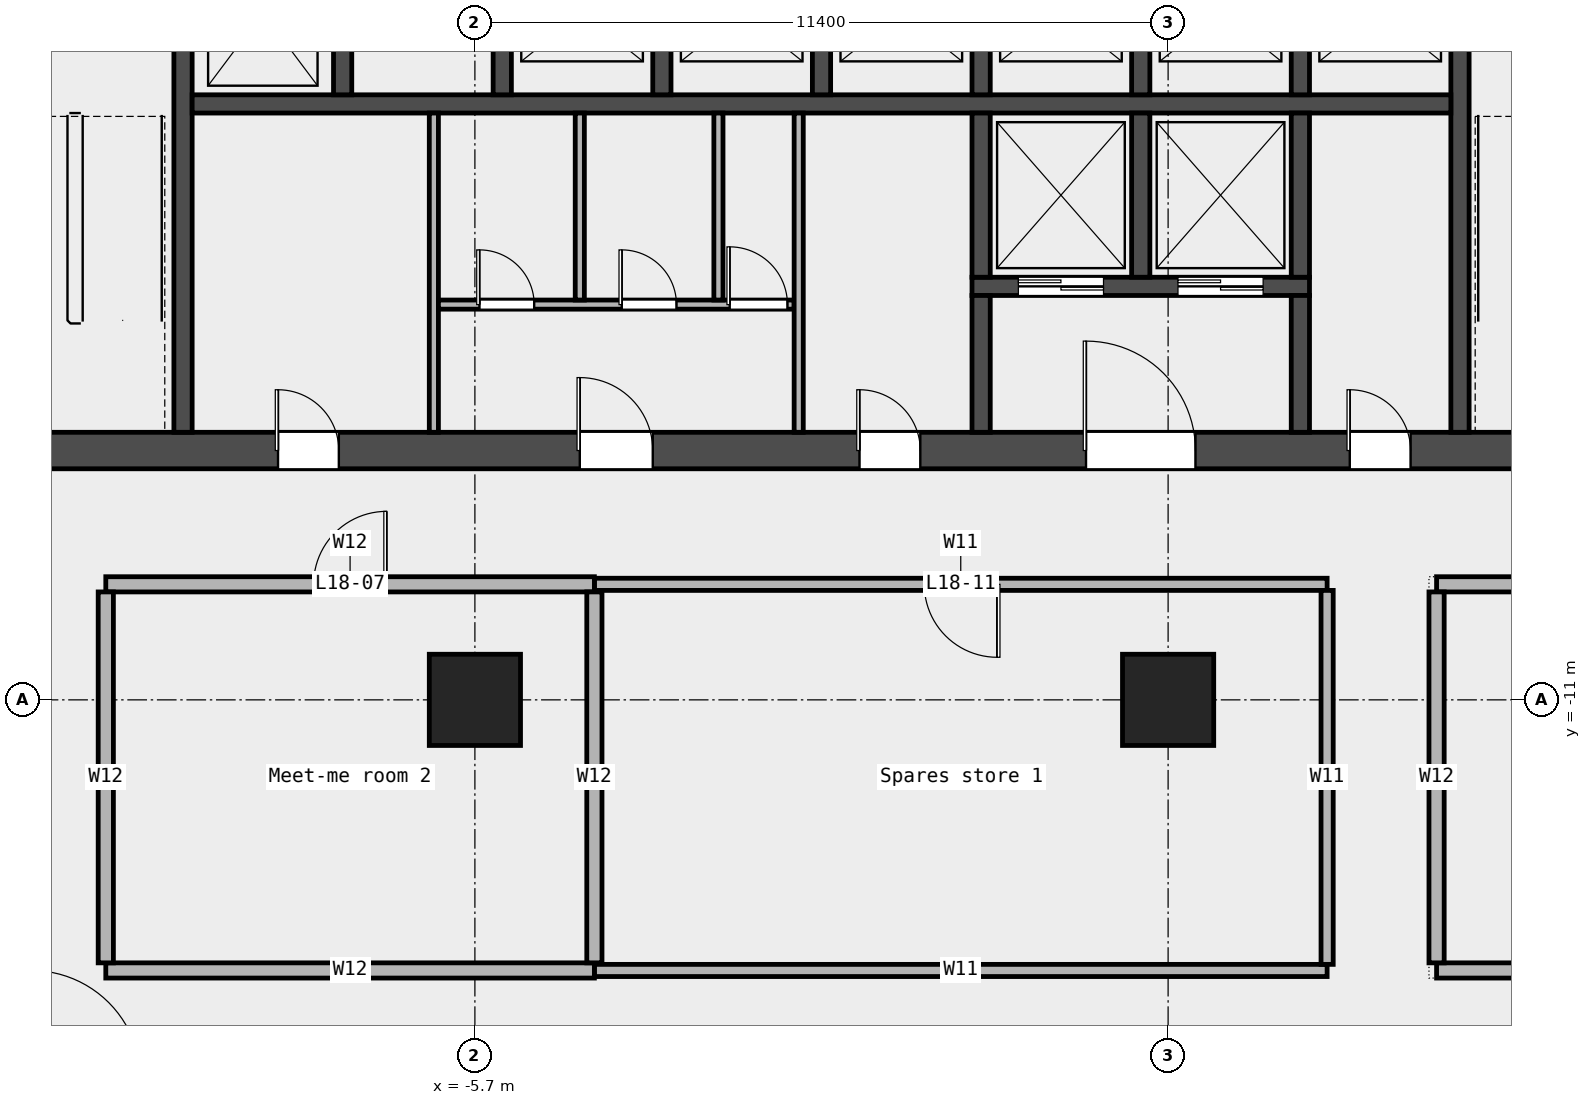
"""IFC4 building model, lengths in metres.
Left out: names, types, materials, properties, quantities, classifications, styles, units other than length and angle.
Written with IfcOpenShell. Run it as: python <this file> out.ifc"""

import sys

from ifc_helpers import new_model, si_unit, direction, frame, frame_2d, origin, origin_2d, place, context, subcontext, project, spatial, rectangle, extrude, element, fill, save


model = new_model("IFC4")
c1 = context("Model", 3, precision=1e-05, world=origin(), true_north=direction((0.0, 1.0)))
c2 = subcontext(c1, "Body", "Model", "MODEL_VIEW")
j1 = project(units=[si_unit("LENGTHUNIT", "METRE"), si_unit("PLANEANGLEUNIT", "RADIAN")], contexts=[c1])
p1 = place(None, origin())
s1 = spatial("IfcSite", under=j1, at=p1, CompositionType="ELEMENT")
p2 = place(p1, origin())
s2 = spatial("IfcBuilding", under=s1, at=p2, CompositionType="ELEMENT")
p3 = place(p2, frame((0.0, 0.0, 94.6)))
s3 = spatial("IfcBuildingStorey", under=s2, at=p3, CompositionType="ELEMENT", Elevation=94.6)
for number, where, z_axis, x_axis in (
    (1, (-5.7, -11.0, 0.0), (0.0, 0.0, 1.0), (1.0, 0.0, 0.0)),
    (2, (5.7, -11.0, 0.0), (0.0, 0.0, 1.0), (1.0, 0.0, 0.0)),
):
    element("IfcColumn", number, at=place(p3, frame(where, z_axis=z_axis, x_axis=x_axis)), inside=s3, PredefinedType="COLUMN", context=c2, shape_type="SweptSolid", body=[
        extrude(rectangle(XDim=1.5, YDim=1.5, at=origin_2d()), origin(), (0.0, 0.0, 1.0), 4.05),
    ])
p4 = place(p3, frame((-3.735, -15.45, 0.0), z_axis=(0.0, 0.0, 1.0), x_axis=(1.0, 0.0, 0.0)))
e3 = element("IfcWall", 3, at=p4, inside=s3, PredefinedType="PARTITIONING", context=c2, shape_type="SweptSolid", body=[
    extrude(rectangle(XDim=12.05, YDim=0.2, at=frame_2d((6.025, 0.0))), origin(), (0.0, 0.0, 1.0), 4.05),
])
p5 = place(p3, frame((-11.77, -15.45, 0.0), z_axis=(0.0, 0.0, 1.0), x_axis=(1.0, 0.0, 0.0)))
e4 = element("IfcWall", 4, at=p5, inside=s3, PredefinedType="PARTITIONING", context=c2, shape_type="SweptSolid", body=[
    extrude(rectangle(XDim=8.035, YDim=0.25, at=frame_2d((4.018, 0.0))), origin(), (0.0, 0.0, 1.0), 4.05),
])
p6 = place(p3, frame((10.115, -15.45, 0.0), z_axis=(0.0, 0.0, 1.0), x_axis=(1.0, 0.0, 0.0)))
e5 = element("IfcWall", 5, at=p6, inside=s3, PredefinedType="PARTITIONING", context=c2, shape_type="SweptSolid", body=[
    extrude(rectangle(XDim=18.885, YDim=0.25, at=frame_2d((9.442, 0.0))), origin(), (0.0, 0.0, 1.0), 4.05),
])
p7 = place(p6, frame((8.742, 0.0, 0.0)))
e6 = element("IfcOpeningElement", 6, at=p7, cuts=e5, PredefinedType="OPENING", context=c2, shape_type="SweptSolid", body=[
    extrude(rectangle(XDim=1.2, YDim=2.1, at=frame_2d((0.6, 1.05))), frame((0.0, 0.137, 0.0), z_axis=(0.0, -1.0, 0.0), x_axis=(1.0, 0.0, 0.0)), (0.0, 0.0, 1.0), 0.274),
])
p8 = place(p3, frame((-3.735, -9.1, 0.0), z_axis=(0.0, 0.0, 1.0), x_axis=(1.0, 0.0, 0.0)))
e7 = element("IfcWall", 7, at=p8, inside=s3, PredefinedType="PARTITIONING", context=c2, shape_type="SweptSolid", body=[
    extrude(rectangle(XDim=12.05, YDim=0.2, at=frame_2d((6.025, 0.0))), origin(), (0.0, 0.0, 1.0), 4.05),
])
p9 = place(p8, frame((5.425, 0.0, 0.0)))
e8 = element("IfcOpeningElement", 8, at=p9, cuts=e7, PredefinedType="OPENING", context=c2, shape_type="SweptSolid", body=[
    extrude(rectangle(XDim=1.2, YDim=2.1, at=frame_2d((0.6, 1.05))), frame((0.0, 0.112, 0.0), z_axis=(0.0, -1.0, 0.0), x_axis=(1.0, 0.0, 0.0)), (0.0, 0.0, 1.0), 0.224),
])
p10 = place(p3, frame((-11.77, -9.1, 0.0), z_axis=(0.0, 0.0, 1.0), x_axis=(1.0, 0.0, 0.0)))
e9 = element("IfcWall", 9, at=p10, inside=s3, PredefinedType="PARTITIONING", context=c2, shape_type="SweptSolid", body=[
    extrude(rectangle(XDim=8.035, YDim=0.25, at=frame_2d((4.018, 0.0))), origin(), (0.0, 0.0, 1.0), 4.05),
])
p11 = place(p10, frame((3.417, 0.0, 0.0)))
e10 = element("IfcOpeningElement", 10, at=p11, cuts=e9, PredefinedType="OPENING", context=c2, shape_type="SweptSolid", body=[
    extrude(rectangle(XDim=1.2, YDim=2.1, at=frame_2d((0.6, 1.05))), frame((0.0, 0.137, 0.0), z_axis=(0.0, -1.0, 0.0), x_axis=(1.0, 0.0, 0.0)), (0.0, 0.0, 1.0), 0.274),
])
p12 = place(p3, frame((10.115, -9.1, 0.0), z_axis=(0.0, 0.0, 1.0), x_axis=(1.0, 0.0, 0.0)))
e11 = element("IfcWall", 11, at=p12, inside=s3, PredefinedType="PARTITIONING", context=c2, shape_type="SweptSolid", body=[
    extrude(rectangle(XDim=18.885, YDim=0.25, at=frame_2d((9.442, 0.0))), origin(), (0.0, 0.0, 1.0), 4.05),
])
for number, where, z_axis, x_axis in (
    (12, (-11.77, -15.325, 0.0), (0.0, 0.0, 1.0), (0.0, 1.0, 0.0)),
    (13, (-3.735, -15.325, 0.0), (0.0, 0.0, 1.0), (0.0, 1.0, 0.0)),
):
    element("IfcWall", number, at=place(p3, frame(where, z_axis=z_axis, x_axis=x_axis)), inside=s3, PredefinedType="PARTITIONING", context=c2, shape_type="SweptSolid", body=[
        extrude(rectangle(XDim=6.1, YDim=0.25, at=frame_2d((3.05, 0.0))), origin(), (0.0, 0.0, 1.0), 4.05),
    ])
p13 = place(p3, frame((8.315, -15.35, 0.0), z_axis=(0.0, 0.0, 1.0), x_axis=(0.0, 1.0, 0.0)))
e14 = element("IfcWall", 14, at=p13, inside=s3, PredefinedType="PARTITIONING", context=c2, shape_type="SweptSolid", body=[
    extrude(rectangle(XDim=6.15, YDim=0.2, at=frame_2d((3.075, 0.0))), origin(), (0.0, 0.0, 1.0), 4.05),
])
p14 = place(p3, frame((10.115, -15.325, 0.0), z_axis=(0.0, 0.0, 1.0), x_axis=(0.0, 1.0, 0.0)))
e15 = element("IfcWall", 15, at=p14, inside=s3, PredefinedType="PARTITIONING", context=c2, shape_type="SweptSolid", body=[
    extrude(rectangle(XDim=6.1, YDim=0.25, at=frame_2d((3.05, 0.0))), origin(), (0.0, 0.0, 1.0), 4.05),
])
p15 = place(p3, frame((-14.4, -6.9, 0.0), z_axis=(0.0, 0.0, 1.0), x_axis=(1.0, 0.0, 0.0)))
e16 = element("IfcWall", 16, at=p15, inside=s3, PredefinedType="SHEAR", context=c2, shape_type="SweptSolid", body=[
    extrude(rectangle(XDim=28.8, YDim=0.6, at=frame_2d((14.4, 0.0))), origin(), (0.0, 0.0, 1.0), 4.2),
])
p16 = place(p15, frame((5.462, 0.0, 0.0)))
e17 = element("IfcOpeningElement", 17, at=p16, cuts=e16, PredefinedType="OPENING", context=c2, shape_type="SweptSolid", body=[
    extrude(rectangle(XDim=1.0, YDim=2.1, at=frame_2d((0.5, 1.05))), frame((0.0, 0.312, 0.0), z_axis=(0.0, -1.0, 0.0), x_axis=(1.0, 0.0, 0.0)), (0.0, 0.0, 1.0), 0.624),
])
p17 = place(p15, frame((10.425, 0.0, 0.0)))
e18 = element("IfcOpeningElement", 18, at=p17, cuts=e16, PredefinedType="OPENING", context=c2, shape_type="SweptSolid", body=[
    extrude(rectangle(XDim=1.2, YDim=2.1, at=frame_2d((0.6, 1.05))), frame((0.0, 0.312, 0.0), z_axis=(0.0, -1.0, 0.0), x_axis=(1.0, 0.0, 0.0)), (0.0, 0.0, 1.0), 0.624),
])
p18 = place(p15, frame((15.025, 0.0, 0.0)))
e19 = element("IfcOpeningElement", 19, at=p18, cuts=e16, PredefinedType="OPENING", context=c2, shape_type="SweptSolid", body=[
    extrude(rectangle(XDim=1.0, YDim=2.1, at=frame_2d((0.5, 1.05))), frame((0.0, 0.312, 0.0), z_axis=(0.0, -1.0, 0.0), x_axis=(1.0, 0.0, 0.0)), (0.0, 0.0, 1.0), 0.624),
])
p19 = place(p15, frame((18.75, 0.0, 0.0)))
e20 = element("IfcOpeningElement", 20, at=p19, cuts=e16, PredefinedType="OPENING", context=c2, shape_type="SweptSolid", body=[
    extrude(rectangle(XDim=1.8, YDim=2.1, at=frame_2d((0.9, 1.05))), frame((0.0, 0.312, 0.0), z_axis=(0.0, -1.0, 0.0), x_axis=(1.0, 0.0, 0.0)), (0.0, 0.0, 1.0), 0.624),
])
p20 = place(p15, frame((23.087, 0.0, 0.0)))
e21 = element("IfcOpeningElement", 21, at=p20, cuts=e16, PredefinedType="OPENING", context=c2, shape_type="SweptSolid", body=[
    extrude(rectangle(XDim=1.0, YDim=2.1, at=frame_2d((0.5, 1.05))), frame((0.0, 0.312, 0.0), z_axis=(0.0, -1.0, 0.0), x_axis=(1.0, 0.0, 0.0)), (0.0, 0.0, 1.0), 0.624),
])
for number, where, z_axis, x_axis in (
    (22, (-10.5, -6.6, 0.0), (0.0, 0.0, 1.0), (0.0, 1.0, 0.0)),
    (23, (10.5, -6.6, 0.0), (0.0, 0.0, 1.0), (0.0, 1.0, 0.0)),
):
    element("IfcWall", number, at=place(p3, frame(where, z_axis=z_axis, x_axis=x_axis)), inside=s3, PredefinedType="SHEAR", context=c2, shape_type="SweptSolid", body=[
        extrude(rectangle(XDim=8.55, YDim=0.3, at=frame_2d((4.275, 0.0))), origin(), (0.0, 0.0, 1.0), 4.2),
    ])
p21 = place(p3, frame((-10.35, -1.2, 0.0), z_axis=(0.0, 0.0, 1.0), x_axis=(1.0, 0.0, 0.0)))
e24 = element("IfcWall", 24, at=p21, inside=s3, PredefinedType="SOLIDWALL", context=c2, shape_type="SweptSolid", body=[
    extrude(rectangle(XDim=20.7, YDim=0.3, at=frame_2d((10.35, 0.0))), origin(), (0.0, 0.0, 1.0), 4.2),
])
for number, where, z_axis, x_axis in (
    (25, (-7.875, -1.05, 0.0), (0.0, 0.0, 1.0), (0.0, 1.0, 0.0)),
    (26, (-5.25, -1.05, 0.0), (0.0, 0.0, 1.0), (0.0, 1.0, 0.0)),
    (27, (-2.625, -1.05, 0.0), (0.0, 0.0, 1.0), (0.0, 1.0, 0.0)),
    (28, (0.0, -1.05, 0.0), (0.0, 0.0, 1.0), (0.0, 1.0, 0.0)),
    (29, (2.625, -1.05, 0.0), (0.0, 0.0, 1.0), (0.0, 1.0, 0.0)),
    (30, (5.25, -1.05, 0.0), (0.0, 0.0, 1.0), (0.0, 1.0, 0.0)),
    (31, (7.875, -1.05, 0.0), (0.0, 0.0, 1.0), (0.0, 1.0, 0.0)),
):
    element("IfcWall", number, at=place(p3, frame(where, z_axis=z_axis, x_axis=x_axis)), inside=s3, PredefinedType="SOLIDWALL", context=c2, shape_type="SweptSolid", body=[
        extrude(rectangle(XDim=2.7, YDim=0.3, at=frame_2d((1.35, 0.0))), origin(), (0.0, 0.0, 1.0), 4.2),
    ])
p22 = place(p3, frame((2.475, -4.2, 0.0), z_axis=(0.0, 0.0, 1.0), x_axis=(1.0, 0.0, 0.0)))
e32 = element("IfcWall", 32, at=p22, inside=s3, PredefinedType="SOLIDWALL", context=c2, shape_type="SweptSolid", body=[
    extrude(rectangle(XDim=5.55, YDim=0.3, at=frame_2d((2.775, 0.0))), origin(), (0.0, 0.0, 1.0), 4.2),
])
p23 = place(p22, frame((0.762, 0.0, 0.0)))
e33 = element("IfcOpeningElement", 33, at=p23, cuts=e32, PredefinedType="OPENING", context=c2, shape_type="SweptSolid", body=[
    extrude(rectangle(XDim=1.4, YDim=2.1, at=frame_2d((0.7, 1.05))), frame((0.0, 0.162, 0.0), z_axis=(0.0, -1.0, 0.0), x_axis=(1.0, 0.0, 0.0)), (0.0, 0.0, 1.0), 0.324),
])
p24 = place(p22, frame((3.387, 0.0, 0.0)))
e34 = element("IfcOpeningElement", 34, at=p24, cuts=e32, PredefinedType="OPENING", context=c2, shape_type="SweptSolid", body=[
    extrude(rectangle(XDim=1.4, YDim=2.1, at=frame_2d((0.7, 1.05))), frame((0.0, 0.162, 0.0), z_axis=(0.0, -1.0, 0.0), x_axis=(1.0, 0.0, 0.0)), (0.0, 0.0, 1.0), 0.324),
])
p25 = place(p3, frame((2.625, -4.05, 0.0), z_axis=(0.0, 0.0, 1.0), x_axis=(0.0, 1.0, 0.0)))
e35 = element("IfcWall", 35, at=p25, inside=s3, PredefinedType="SOLIDWALL", context=c2, shape_type="SweptSolid", body=[
    extrude(rectangle(XDim=2.7, YDim=0.3, at=frame_2d((1.35, 0.0))), origin(), (0.0, 0.0, 1.0), 4.2),
])
p26 = place(p3, frame((2.625, -6.6, 0.0), z_axis=(0.0, 0.0, 1.0), x_axis=(0.0, 1.0, 0.0)))
e36 = element("IfcWall", 36, at=p26, inside=s3, PredefinedType="SOLIDWALL", context=c2, shape_type="SweptSolid", body=[
    extrude(rectangle(XDim=2.25, YDim=0.3, at=frame_2d((1.125, 0.0))), origin(), (0.0, 0.0, 1.0), 4.2),
])
for number, where, z_axis, x_axis in (
    (37, (5.25, -4.05, 0.0), (0.0, 0.0, 1.0), (0.0, 1.0, 0.0)),
    (38, (7.875, -4.05, 0.0), (0.0, 0.0, 1.0), (0.0, 1.0, 0.0)),
):
    element("IfcWall", number, at=place(p3, frame(where, z_axis=z_axis, x_axis=x_axis)), inside=s3, PredefinedType="SOLIDWALL", context=c2, shape_type="SweptSolid", body=[
        extrude(rectangle(XDim=2.7, YDim=0.3, at=frame_2d((1.35, 0.0))), origin(), (0.0, 0.0, 1.0), 4.2),
    ])
p27 = place(p3, frame((7.875, -6.6, 0.0), z_axis=(0.0, 0.0, 1.0), x_axis=(0.0, 1.0, 0.0)))
e39 = element("IfcWall", 39, at=p27, inside=s3, PredefinedType="SOLIDWALL", context=c2, shape_type="SweptSolid", body=[
    extrude(rectangle(XDim=2.25, YDim=0.3, at=frame_2d((1.125, 0.0))), origin(), (0.0, 0.0, 1.0), 4.2),
])
p28 = place(p3, frame((-6.375, -6.6, 0.0), z_axis=(0.0, 0.0, 1.0), x_axis=(0.0, 1.0, 0.0)))
e40 = element("IfcWall", 40, at=p28, inside=s3, PredefinedType="PARTITIONING", context=c2, shape_type="SweptSolid", body=[
    extrude(rectangle(XDim=5.25, YDim=0.15, at=frame_2d((2.625, 0.0))), origin(), (0.0, 0.0, 1.0), 4.2),
])
p29 = place(p3, frame((-6.3, -4.5, 0.0), z_axis=(0.0, 0.0, 1.0), x_axis=(1.0, 0.0, 0.0)))
e41 = element("IfcWall", 41, at=p29, inside=s3, PredefinedType="PARTITIONING", context=c2, shape_type="SweptSolid", body=[
    extrude(rectangle(XDim=5.85, YDim=0.15, at=frame_2d((2.925, 0.0))), origin(), (0.0, 0.0, 1.0), 4.2),
])
p30 = place(p29, frame((0.675, 0.0, 0.0)))
e42 = element("IfcOpeningElement", 42, at=p30, cuts=e41, PredefinedType="OPENING", context=c2, shape_type="SweptSolid", body=[
    extrude(rectangle(XDim=0.9, YDim=2.1, at=frame_2d((0.45, 1.05))), frame((0.0, 0.087, 0.0), z_axis=(0.0, -1.0, 0.0), x_axis=(1.0, 0.0, 0.0)), (0.0, 0.0, 1.0), 0.174),
])
p31 = place(p29, frame((3.015, 0.0, 0.0)))
e43 = element("IfcOpeningElement", 43, at=p31, cuts=e41, PredefinedType="OPENING", context=c2, shape_type="SweptSolid", body=[
    extrude(rectangle(XDim=0.9, YDim=2.1, at=frame_2d((0.45, 1.05))), frame((0.0, 0.087, 0.0), z_axis=(0.0, -1.0, 0.0), x_axis=(1.0, 0.0, 0.0)), (0.0, 0.0, 1.0), 0.174),
])
p32 = place(p29, frame((4.79, 0.0, 0.0)))
e44 = element("IfcOpeningElement", 44, at=p32, cuts=e41, PredefinedType="OPENING", context=c2, shape_type="SweptSolid", body=[
    extrude(rectangle(XDim=0.95, YDim=2.1, at=frame_2d((0.475, 1.05))), frame((0.0, 0.087, 0.0), z_axis=(0.0, -1.0, 0.0), x_axis=(1.0, 0.0, 0.0)), (0.0, 0.0, 1.0), 0.174),
])
for number, where, z_axis, x_axis in (
    (45, (-3.975, -4.425, 0.0), (0.0, 0.0, 1.0), (0.0, 1.0, 0.0)),
    (46, (-1.695, -4.425, 0.0), (0.0, 0.0, 1.0), (0.0, 1.0, 0.0)),
):
    element("IfcWall", number, at=place(p3, frame(where, z_axis=z_axis, x_axis=x_axis)), inside=s3, PredefinedType="PARTITIONING", context=c2, shape_type="SweptSolid", body=[
        extrude(rectangle(XDim=3.075, YDim=0.15, at=frame_2d((1.538, 0.0))), origin(), (0.0, 0.0, 1.0), 4.2),
    ])
p33 = place(p3, frame((-0.375, -6.6, 0.0), z_axis=(0.0, 0.0, 1.0), x_axis=(0.0, 1.0, 0.0)))
e47 = element("IfcWall", 47, at=p33, inside=s3, PredefinedType="PARTITIONING", context=c2, shape_type="SweptSolid", body=[
    extrude(rectangle(XDim=5.25, YDim=0.15, at=frame_2d((2.625, 0.0))), origin(), (0.0, 0.0, 1.0), 4.2),
])
p34 = place(p11, origin())
e48 = element("IfcDoor", 48, at=p34, inside=s3, OperationType="SINGLE_SWING_RIGHT", PredefinedType="DOOR", context=c2, shape_type="SweptSolid", body=[
    extrude(rectangle(XDim=1.2, YDim=2.1, at=frame_2d((0.6, 1.05))), frame((0.0, 0.025, 0.0), z_axis=(0.0, -1.0, 0.0), x_axis=(1.0, 0.0, 0.0)), (0.0, 0.0, 1.0), 0.05),
])
fill(e10, e48)
p35 = place(p9, origin())
e49 = element("IfcDoor", 49, at=p35, inside=s3, OperationType="SINGLE_SWING_LEFT", PredefinedType="DOOR", context=c2, shape_type="SweptSolid", body=[
    extrude(rectangle(XDim=1.2, YDim=2.1, at=frame_2d((0.6, 1.05))), frame((0.0, 0.025, 0.0), z_axis=(0.0, -1.0, 0.0), x_axis=(1.0, 0.0, 0.0)), (0.0, 0.0, 1.0), 0.05),
])
fill(e8, e49)
p36 = place(p23, origin())
e50 = element("IfcDoor", 50, at=p36, inside=s3, OperationType="DOUBLE_DOOR_SLIDING", PredefinedType="DOOR", context=c2, shape_type="SweptSolid", body=[
    extrude(rectangle(XDim=1.4, YDim=2.1, at=frame_2d((0.7, 1.05))), frame((0.0, 0.025, 0.0), z_axis=(0.0, -1.0, 0.0), x_axis=(1.0, 0.0, 0.0)), (0.0, 0.0, 1.0), 0.05),
])
fill(e33, e50)
p37 = place(p24, origin())
e51 = element("IfcDoor", 51, at=p37, inside=s3, OperationType="DOUBLE_DOOR_SLIDING", PredefinedType="DOOR", context=c2, shape_type="SweptSolid", body=[
    extrude(rectangle(XDim=1.4, YDim=2.1, at=frame_2d((0.7, 1.05))), frame((0.0, 0.025, 0.0), z_axis=(0.0, -1.0, 0.0), x_axis=(1.0, 0.0, 0.0)), (0.0, 0.0, 1.0), 0.05),
])
fill(e34, e51)
p38 = place(p16, origin())
e52 = element("IfcDoor", 52, at=p38, inside=s3, OperationType="SINGLE_SWING_LEFT", PredefinedType="DOOR", context=c2, shape_type="SweptSolid", body=[
    extrude(rectangle(XDim=1.0, YDim=2.1, at=frame_2d((0.5, 1.05))), frame((0.0, 0.025, 0.0), z_axis=(0.0, -1.0, 0.0), x_axis=(1.0, 0.0, 0.0)), (0.0, 0.0, 1.0), 0.05),
])
fill(e17, e52)
p39 = place(p17, origin())
e53 = element("IfcDoor", 53, at=p39, inside=s3, OperationType="SINGLE_SWING_LEFT", PredefinedType="DOOR", context=c2, shape_type="SweptSolid", body=[
    extrude(rectangle(XDim=1.2, YDim=2.1, at=frame_2d((0.6, 1.05))), frame((0.0, 0.025, 0.0), z_axis=(0.0, -1.0, 0.0), x_axis=(1.0, 0.0, 0.0)), (0.0, 0.0, 1.0), 0.05),
])
fill(e18, e53)
p40 = place(p30, origin())
e54 = element("IfcDoor", 54, at=p40, inside=s3, OperationType="SINGLE_SWING_LEFT", PredefinedType="DOOR", context=c2, shape_type="SweptSolid", body=[
    extrude(rectangle(XDim=0.9, YDim=2.1, at=frame_2d((0.45, 1.05))), frame((0.0, 0.025, 0.0), z_axis=(0.0, -1.0, 0.0), x_axis=(1.0, 0.0, 0.0)), (0.0, 0.0, 1.0), 0.05),
])
fill(e42, e54)
p41 = place(p31, origin())
e55 = element("IfcDoor", 55, at=p41, inside=s3, OperationType="SINGLE_SWING_LEFT", PredefinedType="DOOR", context=c2, shape_type="SweptSolid", body=[
    extrude(rectangle(XDim=0.9, YDim=2.1, at=frame_2d((0.45, 1.05))), frame((0.0, 0.025, 0.0), z_axis=(0.0, -1.0, 0.0), x_axis=(1.0, 0.0, 0.0)), (0.0, 0.0, 1.0), 0.05),
])
fill(e43, e55)
p42 = place(p32, origin())
e56 = element("IfcDoor", 56, at=p42, inside=s3, OperationType="SINGLE_SWING_LEFT", PredefinedType="DOOR", context=c2, shape_type="SweptSolid", body=[
    extrude(rectangle(XDim=0.95, YDim=2.1, at=frame_2d((0.475, 1.05))), frame((0.0, 0.025, 0.0), z_axis=(0.0, -1.0, 0.0), x_axis=(1.0, 0.0, 0.0)), (0.0, 0.0, 1.0), 0.05),
])
fill(e44, e56)
p43 = place(p18, origin())
e57 = element("IfcDoor", 57, at=p43, inside=s3, OperationType="SINGLE_SWING_LEFT", PredefinedType="DOOR", context=c2, shape_type="SweptSolid", body=[
    extrude(rectangle(XDim=1.0, YDim=2.1, at=frame_2d((0.5, 1.05))), frame((0.0, 0.025, 0.0), z_axis=(0.0, -1.0, 0.0), x_axis=(1.0, 0.0, 0.0)), (0.0, 0.0, 1.0), 0.05),
])
fill(e19, e57)
p44 = place(p19, origin())
e58 = element("IfcDoor", 58, at=p44, inside=s3, OperationType="DOUBLE_DOOR_SINGLE_SWING", PredefinedType="DOOR", context=c2, shape_type="SweptSolid", body=[
    extrude(rectangle(XDim=1.8, YDim=2.1, at=frame_2d((0.9, 1.05))), frame((0.0, 0.025, 0.0), z_axis=(0.0, -1.0, 0.0), x_axis=(1.0, 0.0, 0.0)), (0.0, 0.0, 1.0), 0.05),
])
fill(e20, e58)
p45 = place(p20, origin())
e59 = element("IfcDoor", 59, at=p45, inside=s3, OperationType="SINGLE_SWING_LEFT", PredefinedType="DOOR", context=c2, shape_type="SweptSolid", body=[
    extrude(rectangle(XDim=1.0, YDim=2.1, at=frame_2d((0.5, 1.05))), frame((0.0, 0.025, 0.0), z_axis=(0.0, -1.0, 0.0), x_axis=(1.0, 0.0, 0.0)), (0.0, 0.0, 1.0), 0.05),
])
fill(e21, e59)
save(model, sys.argv[1])
